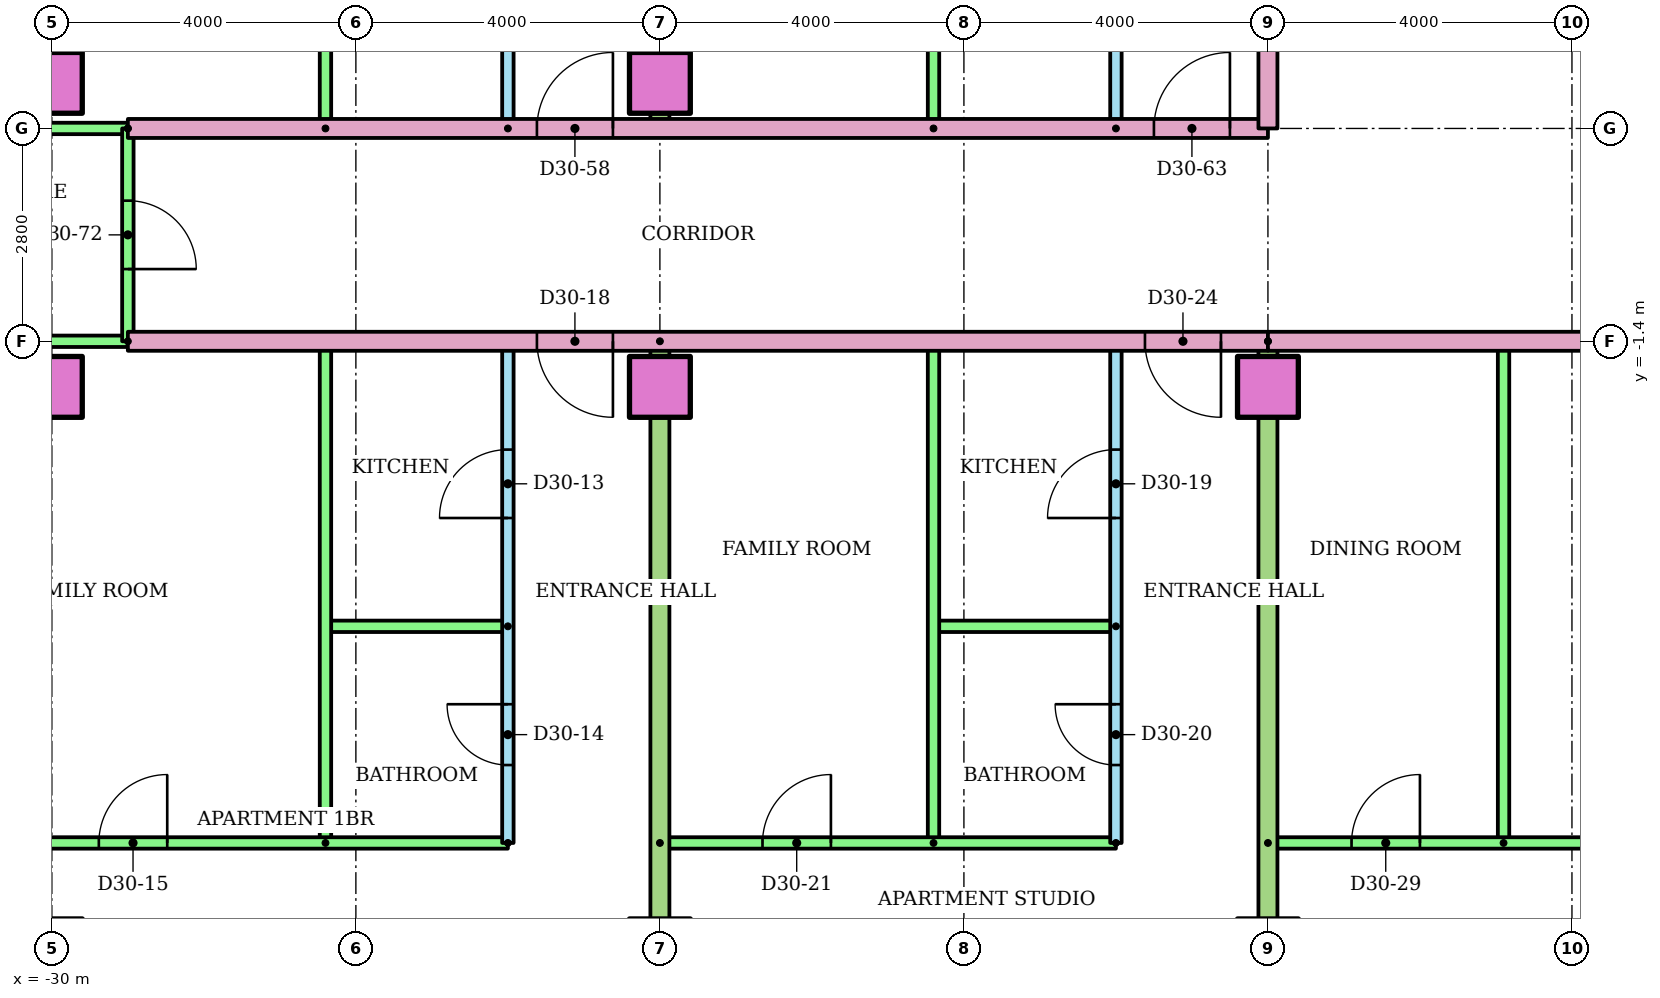
"""IFC4 building model, lengths in metres.
Left out: names, types, materials, properties, quantities, classifications, styles, units other than length and angle.
Written with IfcOpenShell. Run it as: python <this file> out.ifc"""

import sys

from ifc_helpers import new_model, si_unit, direction, frame, frame_2d, origin, origin_2d, place, context, subcontext, project, spatial, rectangle, extrude, element, fill, save


model = new_model("IFC4")
c1 = context("Model", 3, precision=1e-05, world=origin(), true_north=direction((0.0, 1.0)))
c2 = subcontext(c1, "Body", "Model", "MODEL_VIEW")
j1 = project(units=[si_unit("LENGTHUNIT", "METRE"), si_unit("PLANEANGLEUNIT", "RADIAN")], contexts=[c1])
p1 = place(None, origin())
s1 = spatial("IfcSite", under=j1, at=p1, CompositionType="ELEMENT")
p2 = place(p1, origin())
s2 = spatial("IfcBuilding", under=s1, at=p2, CompositionType="ELEMENT")
p3 = place(p2, frame((0.0, 0.0, 119.8)))
s3 = spatial("IfcBuildingStorey", under=s2, at=p3, CompositionType="ELEMENT", Elevation=119.8)
for number, where in (
    (1, (-30.0, -9.4, 0.0)),
    (2, (-22.0, -9.4, 0.0)),
    (3, (-14.0, -9.4, 0.0)),
    (4, (-30.0, -2.0, 0.0)),
    (5, (-22.0, -2.0, 0.0)),
    (6, (-14.0, -2.0, 0.0)),
    (7, (-30.0, 2.0, 0.0)),
    (8, (-22.0, 2.0, 0.0)),
):
    element("IfcColumn", number, at=place(p3, frame(where)), inside=s3, PredefinedType="COLUMN", context=c2, shape_type="SweptSolid", body=[
        extrude(rectangle(XDim=0.8, YDim=0.8, at=origin_2d()), origin(), (0.0, 0.0, 1.0), 3.2),
    ])
p4 = place(p3, frame((-24.0, -8.0, 0.0), z_axis=(0.0, 0.0, 1.0), x_axis=(0.0, 1.0, 0.0)))
e9 = element("IfcWall", 9, at=p4, inside=s3, PredefinedType="PARTITIONING", context=c2, shape_type="SweptSolid", body=[
    extrude(rectangle(XDim=6.6, YDim=0.15, at=frame_2d((3.3, 0.0))), origin(), (0.0, 0.0, 1.0), 2.4),
])
p5 = place(p4, frame((4.275, 0.0, 0.0)))
e10 = element("IfcOpeningElement", 10, at=p5, cuts=e9, PredefinedType="OPENING", context=c2, shape_type="SweptSolid", body=[
    extrude(rectangle(XDim=0.9, YDim=2.1, at=frame_2d((0.45, 1.05))), frame((0.0, 0.085, 0.0), z_axis=(0.0, -1.0, 0.0), x_axis=(1.0, 0.0, 0.0)), (0.0, 0.0, 1.0), 0.17),
])
p6 = place(p4, frame((1.025, 0.0, 0.0)))
e11 = element("IfcOpeningElement", 11, at=p6, cuts=e9, PredefinedType="OPENING", context=c2, shape_type="SweptSolid", body=[
    extrude(rectangle(XDim=0.8, YDim=2.1, at=frame_2d((0.4, 1.05))), frame((0.0, 0.085, 0.0), z_axis=(0.0, -1.0, 0.0), x_axis=(1.0, 0.0, 0.0)), (0.0, 0.0, 1.0), 0.17),
])
p7 = place(p3, frame((-24.0, -5.15, 0.0), z_axis=(0.0, 0.0, 1.0), x_axis=(-1.0, 0.0, 0.0)))
e12 = element("IfcWall", 12, at=p7, inside=s3, PredefinedType="PARTITIONING", context=c2, shape_type="SweptSolid", body=[
    extrude(rectangle(XDim=2.4, YDim=0.15, at=frame_2d((1.2, 0.0))), origin(), (0.0, 0.0, 1.0), 2.4),
])
p8 = place(p3, frame((-26.4, -8.0, 0.0), z_axis=(0.0, 0.0, 1.0), x_axis=(0.0, 1.0, 0.0)))
e13 = element("IfcWall", 13, at=p8, inside=s3, PredefinedType="PARTITIONING", context=c2, shape_type="SweptSolid", body=[
    extrude(rectangle(XDim=6.6, YDim=0.15, at=frame_2d((3.3, 0.0))), origin(), (0.0, 0.0, 1.0), 2.4),
])
p9 = place(p3, frame((-32.71, -8.0, 0.0)))
e14 = element("IfcWall", 14, at=p9, inside=s3, PredefinedType="PARTITIONING", context=c2, shape_type="SweptSolid", body=[
    extrude(rectangle(XDim=8.71, YDim=0.15, at=frame_2d((4.355, 0.0))), origin(), (0.0, 0.0, 1.0), 2.4),
])
p10 = place(p9, frame((3.328, 0.0, 0.0)))
e15 = element("IfcOpeningElement", 15, at=p10, cuts=e14, PredefinedType="OPENING", context=c2, shape_type="SweptSolid", body=[
    extrude(rectangle(XDim=0.9, YDim=2.1, at=frame_2d((0.45, 1.05))), frame((0.0, 0.085, 0.0), z_axis=(0.0, -1.0, 0.0), x_axis=(1.0, 0.0, 0.0)), (0.0, 0.0, 1.0), 0.17),
])
p11 = place(p3, frame((-16.0, -8.0, 0.0), z_axis=(0.0, 0.0, 1.0), x_axis=(0.0, 1.0, 0.0)))
e16 = element("IfcWall", 16, at=p11, inside=s3, PredefinedType="PARTITIONING", context=c2, shape_type="SweptSolid", body=[
    extrude(rectangle(XDim=6.6, YDim=0.15, at=frame_2d((3.3, 0.0))), origin(), (0.0, 0.0, 1.0), 2.4),
])
p12 = place(p11, frame((4.275, 0.0, 0.0)))
e17 = element("IfcOpeningElement", 17, at=p12, cuts=e16, PredefinedType="OPENING", context=c2, shape_type="SweptSolid", body=[
    extrude(rectangle(XDim=0.9, YDim=2.1, at=frame_2d((0.45, 1.05))), frame((0.0, 0.085, 0.0), z_axis=(0.0, -1.0, 0.0), x_axis=(1.0, 0.0, 0.0)), (0.0, 0.0, 1.0), 0.17),
])
p13 = place(p11, frame((1.025, 0.0, 0.0)))
e18 = element("IfcOpeningElement", 18, at=p13, cuts=e16, PredefinedType="OPENING", context=c2, shape_type="SweptSolid", body=[
    extrude(rectangle(XDim=0.8, YDim=2.1, at=frame_2d((0.4, 1.05))), frame((0.0, 0.085, 0.0), z_axis=(0.0, -1.0, 0.0), x_axis=(1.0, 0.0, 0.0)), (0.0, 0.0, 1.0), 0.17),
])
p14 = place(p3, frame((-16.0, -5.15, 0.0), z_axis=(0.0, 0.0, 1.0), x_axis=(-1.0, 0.0, 0.0)))
e19 = element("IfcWall", 19, at=p14, inside=s3, PredefinedType="PARTITIONING", context=c2, shape_type="SweptSolid", body=[
    extrude(rectangle(XDim=2.4, YDim=0.15, at=frame_2d((1.2, 0.0))), origin(), (0.0, 0.0, 1.0), 2.4),
])
p15 = place(p3, frame((-18.4, -8.0, 0.0), z_axis=(0.0, 0.0, 1.0), x_axis=(0.0, 1.0, 0.0)))
e20 = element("IfcWall", 20, at=p15, inside=s3, PredefinedType="PARTITIONING", context=c2, shape_type="SweptSolid", body=[
    extrude(rectangle(XDim=6.6, YDim=0.15, at=frame_2d((3.3, 0.0))), origin(), (0.0, 0.0, 1.0), 2.4),
])
p16 = place(p3, frame((-22.0, -8.0, 0.0)))
e21 = element("IfcWall", 21, at=p16, inside=s3, PredefinedType="PARTITIONING", context=c2, shape_type="SweptSolid", body=[
    extrude(rectangle(XDim=6.0, YDim=0.15, at=frame_2d((3.0, 0.0))), origin(), (0.0, 0.0, 1.0), 2.4),
])
p17 = place(p16, frame((1.35, 0.0, 0.0)))
e22 = element("IfcOpeningElement", 22, at=p17, cuts=e21, PredefinedType="OPENING", context=c2, shape_type="SweptSolid", body=[
    extrude(rectangle(XDim=0.9, YDim=2.1, at=frame_2d((0.45, 1.05))), frame((0.0, 0.085, 0.0), z_axis=(0.0, -1.0, 0.0), x_axis=(1.0, 0.0, 0.0)), (0.0, 0.0, 1.0), 0.17),
])
p18 = place(p3, frame((-22.0, -1.4, 0.0), z_axis=(0.0, 0.0, 1.0), x_axis=(0.0, -1.0, 0.0)))
e23 = element("IfcWall", 23, at=p18, inside=s3, PredefinedType="PARTITIONING", context=c2, shape_type="SweptSolid", body=[
    extrude(rectangle(XDim=14.91, YDim=0.25, at=frame_2d((7.455, 0.0))), origin(), (0.0, 0.0, 1.0), 2.4),
])
p19 = place(p3, frame((-10.9, -8.0, 0.0), z_axis=(0.0, 0.0, 1.0), x_axis=(0.0, 1.0, 0.0)))
e24 = element("IfcWall", 24, at=p19, inside=s3, PredefinedType="PARTITIONING", context=c2, shape_type="SweptSolid", body=[
    extrude(rectangle(XDim=6.6, YDim=0.15, at=frame_2d((3.3, 0.0))), origin(), (0.0, 0.0, 1.0), 2.4),
])
p20 = place(p3, frame((-14.0, -8.0, 0.0)))
e25 = element("IfcWall", 25, at=p20, inside=s3, PredefinedType="PARTITIONING", context=c2, shape_type="SweptSolid", body=[
    extrude(rectangle(XDim=14.0, YDim=0.15, at=frame_2d((7.0, 0.0))), origin(), (0.0, 0.0, 1.0), 2.4),
])
p21 = place(p20, frame((8.775, 0.0, 0.0)))
e26 = element("IfcOpeningElement", 26, at=p21, cuts=e25, PredefinedType="OPENING", context=c2, shape_type="SweptSolid", body=[
    extrude(rectangle(XDim=0.9, YDim=2.1, at=frame_2d((0.45, 1.05))), frame((0.0, 0.085, 0.0), z_axis=(0.0, -1.0, 0.0), x_axis=(1.0, 0.0, 0.0)), (0.0, 0.0, 1.0), 0.17),
])
p22 = place(p20, frame((4.525, 0.0, 0.0)))
e27 = element("IfcOpeningElement", 27, at=p22, cuts=e25, PredefinedType="OPENING", context=c2, shape_type="SweptSolid", body=[
    extrude(rectangle(XDim=0.9, YDim=2.1, at=frame_2d((0.45, 1.05))), frame((0.0, 0.085, 0.0), z_axis=(0.0, -1.0, 0.0), x_axis=(1.0, 0.0, 0.0)), (0.0, 0.0, 1.0), 0.17),
])
p23 = place(p20, frame((1.1, 0.0, 0.0)))
e28 = element("IfcOpeningElement", 28, at=p23, cuts=e25, PredefinedType="OPENING", context=c2, shape_type="SweptSolid", body=[
    extrude(rectangle(XDim=0.9, YDim=2.1, at=frame_2d((0.45, 1.05))), frame((0.0, 0.085, 0.0), z_axis=(0.0, -1.0, 0.0), x_axis=(1.0, 0.0, 0.0)), (0.0, 0.0, 1.0), 0.17),
])
p24 = place(p3, frame((-14.0, -1.4, 0.0), z_axis=(0.0, 0.0, 1.0), x_axis=(0.0, -1.0, 0.0)))
e29 = element("IfcWall", 29, at=p24, inside=s3, PredefinedType="PARTITIONING", context=c2, shape_type="SweptSolid", body=[
    extrude(rectangle(XDim=14.91, YDim=0.25, at=frame_2d((7.455, 0.0))), origin(), (0.0, 0.0, 1.0), 2.4),
])
p25 = place(p3, frame((-14.0, -1.4, 0.0), z_axis=(0.0, 0.0, 1.0), x_axis=(-1.0, 0.0, 0.0)))
e30 = element("IfcWall", 30, at=p25, inside=s3, PredefinedType="PARTITIONING", context=c2, shape_type="SweptSolid", body=[
    extrude(rectangle(XDim=15.0, YDim=0.25, at=frame_2d((7.5, 0.0))), origin(), (0.0, 0.0, 1.0), 2.4),
])
p26 = place(p25, frame((8.618, 0.0, 0.0)))
e31 = element("IfcOpeningElement", 31, at=p26, cuts=e30, PredefinedType="OPENING", context=c2, shape_type="SweptSolid", body=[
    extrude(rectangle(XDim=1.0, YDim=2.1, at=frame_2d((0.5, 1.05))), frame((0.0, 0.135, 0.0), z_axis=(0.0, -1.0, 0.0), x_axis=(1.0, 0.0, 0.0)), (0.0, 0.0, 1.0), 0.27),
])
p27 = place(p25, frame((0.618, 0.0, 0.0)))
e32 = element("IfcOpeningElement", 32, at=p27, cuts=e30, PredefinedType="OPENING", context=c2, shape_type="SweptSolid", body=[
    extrude(rectangle(XDim=1.0, YDim=2.1, at=frame_2d((0.5, 1.05))), frame((0.0, 0.135, 0.0), z_axis=(0.0, -1.0, 0.0), x_axis=(1.0, 0.0, 0.0)), (0.0, 0.0, 1.0), 0.27),
])
p28 = place(p3, frame((-29.0, -1.4, 0.0), z_axis=(0.0, 0.0, 1.0), x_axis=(-1.0, 0.0, 0.0)))
e33 = element("IfcWall", 33, at=p28, inside=s3, PredefinedType="PARTITIONING", context=c2, shape_type="SweptSolid", body=[
    extrude(rectangle(XDim=3.72, YDim=0.15, at=frame_2d((1.86, 0.0))), origin(), (0.0, 0.0, 1.0), 2.4),
])
p29 = place(p3, frame((-24.0, 1.4, 0.0), z_axis=(0.0, 0.0, 1.0), x_axis=(0.0, 1.0, 0.0)))
e34 = element("IfcWall", 34, at=p29, inside=s3, PredefinedType="PARTITIONING", context=c2, shape_type="SweptSolid", body=[
    extrude(rectangle(XDim=9.0, YDim=0.15, at=frame_2d((4.5, 0.0))), origin(), (0.0, 0.0, 1.0), 2.4),
])
p30 = place(p29, frame((2.05, 0.0, 0.0)))
e35 = element("IfcOpeningElement", 35, at=p30, cuts=e34, PredefinedType="OPENING", context=c2, shape_type="SweptSolid", body=[
    extrude(rectangle(XDim=0.9, YDim=2.1, at=frame_2d((0.45, 1.05))), frame((0.0, 0.085, 0.0), z_axis=(0.0, -1.0, 0.0), x_axis=(1.0, 0.0, 0.0)), (0.0, 0.0, 1.0), 0.17),
])
p31 = place(p29, frame((6.6, 0.0, 0.0)))
e36 = element("IfcOpeningElement", 36, at=p31, cuts=e34, PredefinedType="OPENING", context=c2, shape_type="SweptSolid", body=[
    extrude(rectangle(XDim=0.8, YDim=2.1, at=frame_2d((0.4, 1.05))), frame((0.0, 0.085, 0.0), z_axis=(0.0, -1.0, 0.0), x_axis=(1.0, 0.0, 0.0)), (0.0, 0.0, 1.0), 0.17),
])
p32 = place(p3, frame((-26.4, 1.4, 0.0), z_axis=(0.0, 0.0, 1.0), x_axis=(0.0, 1.0, 0.0)))
e37 = element("IfcWall", 37, at=p32, inside=s3, PredefinedType="PARTITIONING", context=c2, shape_type="SweptSolid", body=[
    extrude(rectangle(XDim=9.0, YDim=0.15, at=frame_2d((4.5, 0.0))), origin(), (0.0, 0.0, 1.0), 2.4),
])
p33 = place(p3, frame((-16.0, 1.4, 0.0), z_axis=(0.0, 0.0, 1.0), x_axis=(0.0, 1.0, 0.0)))
e38 = element("IfcWall", 38, at=p33, inside=s3, PredefinedType="PARTITIONING", context=c2, shape_type="SweptSolid", body=[
    extrude(rectangle(XDim=9.0, YDim=0.15, at=frame_2d((4.5, 0.0))), origin(), (0.0, 0.0, 1.0), 2.4),
])
p34 = place(p33, frame((2.05, 0.0, 0.0)))
e39 = element("IfcOpeningElement", 39, at=p34, cuts=e38, PredefinedType="OPENING", context=c2, shape_type="SweptSolid", body=[
    extrude(rectangle(XDim=0.9, YDim=2.1, at=frame_2d((0.45, 1.05))), frame((0.0, 0.085, 0.0), z_axis=(0.0, -1.0, 0.0), x_axis=(1.0, 0.0, 0.0)), (0.0, 0.0, 1.0), 0.17),
])
p35 = place(p33, frame((6.6, 0.0, 0.0)))
e40 = element("IfcOpeningElement", 40, at=p35, cuts=e38, PredefinedType="OPENING", context=c2, shape_type="SweptSolid", body=[
    extrude(rectangle(XDim=0.8, YDim=2.1, at=frame_2d((0.4, 1.05))), frame((0.0, 0.085, 0.0), z_axis=(0.0, -1.0, 0.0), x_axis=(1.0, 0.0, 0.0)), (0.0, 0.0, 1.0), 0.17),
])
p36 = place(p3, frame((-18.4, 1.4, 0.0), z_axis=(0.0, 0.0, 1.0), x_axis=(0.0, 1.0, 0.0)))
e41 = element("IfcWall", 41, at=p36, inside=s3, PredefinedType="PARTITIONING", context=c2, shape_type="SweptSolid", body=[
    extrude(rectangle(XDim=9.0, YDim=0.15, at=frame_2d((4.5, 0.0))), origin(), (0.0, 0.0, 1.0), 2.4),
])
p37 = place(p3, frame((-22.0, 18.721, 0.0), z_axis=(0.0, 0.0, 1.0), x_axis=(0.0, -1.0, 0.0)))
e42 = element("IfcWall", 42, at=p37, inside=s3, PredefinedType="PARTITIONING", context=c2, shape_type="SweptSolid", body=[
    extrude(rectangle(XDim=17.321, YDim=0.25, at=frame_2d((8.661, 0.0))), origin(), (0.0, 0.0, 1.0), 2.4),
])
p38 = place(p3, frame((-29.0, 1.4, 0.0)))
e43 = element("IfcWall", 43, at=p38, inside=s3, PredefinedType="PARTITIONING", context=c2, shape_type="SweptSolid", body=[
    extrude(rectangle(XDim=15.0, YDim=0.25, at=frame_2d((7.5, 0.0))), origin(), (0.0, 0.0, 1.0), 2.4),
])
p39 = place(p38, frame((5.382, 0.0, 0.0)))
e44 = element("IfcOpeningElement", 44, at=p39, cuts=e43, PredefinedType="OPENING", context=c2, shape_type="SweptSolid", body=[
    extrude(rectangle(XDim=1.0, YDim=2.1, at=frame_2d((0.5, 1.05))), frame((0.0, 0.135, 0.0), z_axis=(0.0, -1.0, 0.0), x_axis=(1.0, 0.0, 0.0)), (0.0, 0.0, 1.0), 0.27),
])
p40 = place(p38, frame((13.5, 0.0, 0.0)))
e45 = element("IfcOpeningElement", 45, at=p40, cuts=e43, PredefinedType="OPENING", context=c2, shape_type="SweptSolid", body=[
    extrude(rectangle(XDim=1.0, YDim=2.1, at=frame_2d((0.5, 1.05))), frame((0.0, 0.135, 0.0), z_axis=(0.0, -1.0, 0.0), x_axis=(1.0, 0.0, 0.0)), (0.0, 0.0, 1.0), 0.27),
])
p41 = place(p3, frame((-32.72, 1.4, 0.0)))
e46 = element("IfcWall", 46, at=p41, inside=s3, PredefinedType="PARTITIONING", context=c2, shape_type="SweptSolid", body=[
    extrude(rectangle(XDim=3.72, YDim=0.15, at=frame_2d((1.86, 0.0))), origin(), (0.0, 0.0, 1.0), 2.4),
])
p42 = place(p3, frame((-29.0, 1.4, 0.0), z_axis=(0.0, 0.0, 1.0), x_axis=(0.0, -1.0, 0.0)))
e47 = element("IfcWall", 47, at=p42, inside=s3, PredefinedType="PARTITIONING", context=c2, shape_type="SweptSolid", body=[
    extrude(rectangle(XDim=2.8, YDim=0.15, at=frame_2d((1.4, 0.0))), origin(), (0.0, 0.0, 1.0), 2.4),
])
p43 = place(p42, frame((0.95, 0.0, 0.0)))
e48 = element("IfcOpeningElement", 48, at=p43, cuts=e47, PredefinedType="OPENING", context=c2, shape_type="SweptSolid", body=[
    extrude(rectangle(XDim=0.9, YDim=2.1, at=frame_2d((0.45, 1.05))), frame((0.0, 0.085, 0.0), z_axis=(0.0, -1.0, 0.0), x_axis=(1.0, 0.0, 0.0)), (0.0, 0.0, 1.0), 0.17),
])
p44 = place(p3, frame((14.0, -1.4, 0.0), z_axis=(0.0, 0.0, 1.0), x_axis=(-1.0, 0.0, 0.0)))
e49 = element("IfcWall", 49, at=p44, inside=s3, PredefinedType="PARTITIONING", context=c2, shape_type="SweptSolid", body=[
    extrude(rectangle(XDim=28.0, YDim=0.25, at=frame_2d((14.0, 0.0))), origin(), (0.0, 0.0, 1.0), 2.4),
])
p45 = place(p44, frame((12.618, 0.0, 0.0)))
e50 = element("IfcOpeningElement", 50, at=p45, cuts=e49, PredefinedType="OPENING", context=c2, shape_type="SweptSolid", body=[
    extrude(rectangle(XDim=1.0, YDim=2.1, at=frame_2d((0.5, 1.05))), frame((0.0, 0.135, 0.0), z_axis=(0.0, -1.0, 0.0), x_axis=(1.0, 0.0, 0.0)), (0.0, 0.0, 1.0), 0.27),
])
p46 = place(p44, frame((10.382, 0.0, 0.0)))
e51 = element("IfcOpeningElement", 51, at=p46, cuts=e49, PredefinedType="OPENING", context=c2, shape_type="SweptSolid", body=[
    extrude(rectangle(XDim=1.0, YDim=2.1, at=frame_2d((0.5, 1.05))), frame((0.0, 0.135, 0.0), z_axis=(0.0, -1.0, 0.0), x_axis=(1.0, 0.0, 0.0)), (0.0, 0.0, 1.0), 0.27),
])
p47 = place(p3, frame((-14.0, 3.0, 0.0), z_axis=(0.0, 0.0, 1.0), x_axis=(0.0, -1.0, 0.0)))
e52 = element("IfcWall", 52, at=p47, inside=s3, PredefinedType="PARTITIONING", context=c2, shape_type="SweptSolid", body=[
    extrude(rectangle(XDim=1.6, YDim=0.25, at=frame_2d((0.8, 0.0))), origin(), (0.0, 0.0, 1.0), 2.4),
])
p48 = place(p5, origin())
e53 = element("IfcDoor", 53, at=p48, inside=s3, OperationType="SINGLE_SWING_LEFT", PredefinedType="DOOR", context=c2, shape_type="SweptSolid", body=[
    extrude(rectangle(XDim=0.9, YDim=2.1, at=frame_2d((0.45, 1.05))), frame((0.0, 0.025, 0.0), z_axis=(0.0, -1.0, 0.0), x_axis=(1.0, 0.0, 0.0)), (0.0, 0.0, 1.0), 0.05),
])
fill(e10, e53)
p49 = place(p6, origin())
e54 = element("IfcDoor", 54, at=p49, inside=s3, OperationType="SINGLE_SWING_RIGHT", PredefinedType="DOOR", context=c2, shape_type="SweptSolid", body=[
    extrude(rectangle(XDim=0.8, YDim=2.1, at=frame_2d((0.4, 1.05))), frame((0.0, 0.025, 0.0), z_axis=(0.0, -1.0, 0.0), x_axis=(1.0, 0.0, 0.0)), (0.0, 0.0, 1.0), 0.05),
])
fill(e11, e54)
p50 = place(p10, origin())
e55 = element("IfcDoor", 55, at=p50, inside=s3, OperationType="SINGLE_SWING_RIGHT", PredefinedType="DOOR", context=c2, shape_type="SweptSolid", body=[
    extrude(rectangle(XDim=0.9, YDim=2.1, at=frame_2d((0.45, 1.05))), frame((0.0, 0.025, 0.0), z_axis=(0.0, -1.0, 0.0), x_axis=(1.0, 0.0, 0.0)), (0.0, 0.0, 1.0), 0.05),
])
fill(e15, e55)
p51 = place(p26, origin())
e56 = element("IfcDoor", 56, at=p51, inside=s3, OperationType="SINGLE_SWING_LEFT", PredefinedType="DOOR", context=c2, shape_type="SweptSolid", body=[
    extrude(rectangle(XDim=1.0, YDim=2.1, at=frame_2d((0.5, 1.05))), frame((0.0, 0.025, 0.0), z_axis=(0.0, -1.0, 0.0), x_axis=(1.0, 0.0, 0.0)), (0.0, 0.0, 1.0), 0.05),
])
fill(e31, e56)
p52 = place(p12, origin())
e57 = element("IfcDoor", 57, at=p52, inside=s3, OperationType="SINGLE_SWING_LEFT", PredefinedType="DOOR", context=c2, shape_type="SweptSolid", body=[
    extrude(rectangle(XDim=0.9, YDim=2.1, at=frame_2d((0.45, 1.05))), frame((0.0, 0.025, 0.0), z_axis=(0.0, -1.0, 0.0), x_axis=(1.0, 0.0, 0.0)), (0.0, 0.0, 1.0), 0.05),
])
fill(e17, e57)
p53 = place(p13, origin())
e58 = element("IfcDoor", 58, at=p53, inside=s3, OperationType="SINGLE_SWING_RIGHT", PredefinedType="DOOR", context=c2, shape_type="SweptSolid", body=[
    extrude(rectangle(XDim=0.8, YDim=2.1, at=frame_2d((0.4, 1.05))), frame((0.0, 0.025, 0.0), z_axis=(0.0, -1.0, 0.0), x_axis=(1.0, 0.0, 0.0)), (0.0, 0.0, 1.0), 0.05),
])
fill(e18, e58)
p54 = place(p17, origin())
e59 = element("IfcDoor", 59, at=p54, inside=s3, OperationType="SINGLE_SWING_RIGHT", PredefinedType="DOOR", context=c2, shape_type="SweptSolid", body=[
    extrude(rectangle(XDim=0.9, YDim=2.1, at=frame_2d((0.45, 1.05))), frame((0.0, 0.025, 0.0), z_axis=(0.0, -1.0, 0.0), x_axis=(1.0, 0.0, 0.0)), (0.0, 0.0, 1.0), 0.05),
])
fill(e22, e59)
p55 = place(p27, origin())
e60 = element("IfcDoor", 60, at=p55, inside=s3, OperationType="SINGLE_SWING_LEFT", PredefinedType="DOOR", context=c2, shape_type="SweptSolid", body=[
    extrude(rectangle(XDim=1.0, YDim=2.1, at=frame_2d((0.5, 1.05))), frame((0.0, 0.025, 0.0), z_axis=(0.0, -1.0, 0.0), x_axis=(1.0, 0.0, 0.0)), (0.0, 0.0, 1.0), 0.05),
])
fill(e32, e60)
p56 = place(p23, origin())
e61 = element("IfcDoor", 61, at=p56, inside=s3, OperationType="SINGLE_SWING_RIGHT", PredefinedType="DOOR", context=c2, shape_type="SweptSolid", body=[
    extrude(rectangle(XDim=0.9, YDim=2.1, at=frame_2d((0.45, 1.05))), frame((0.0, 0.025, 0.0), z_axis=(0.0, -1.0, 0.0), x_axis=(1.0, 0.0, 0.0)), (0.0, 0.0, 1.0), 0.05),
])
fill(e28, e61)
p57 = place(p39, origin())
e62 = element("IfcDoor", 62, at=p57, inside=s3, OperationType="SINGLE_SWING_RIGHT", PredefinedType="DOOR", context=c2, shape_type="SweptSolid", body=[
    extrude(rectangle(XDim=1.0, YDim=2.1, at=frame_2d((0.5, 1.05))), frame((0.0, 0.025, 0.0), z_axis=(0.0, -1.0, 0.0), x_axis=(1.0, 0.0, 0.0)), (0.0, 0.0, 1.0), 0.05),
])
fill(e44, e62)
p58 = place(p40, origin())
e63 = element("IfcDoor", 63, at=p58, inside=s3, OperationType="SINGLE_SWING_RIGHT", PredefinedType="DOOR", context=c2, shape_type="SweptSolid", body=[
    extrude(rectangle(XDim=1.0, YDim=2.1, at=frame_2d((0.5, 1.05))), frame((0.0, 0.025, 0.0), z_axis=(0.0, -1.0, 0.0), x_axis=(1.0, 0.0, 0.0)), (0.0, 0.0, 1.0), 0.05),
])
fill(e45, e63)
p59 = place(p43, origin())
e64 = element("IfcDoor", 64, at=p59, inside=s3, OperationType="SINGLE_SWING_RIGHT", PredefinedType="DOOR", context=c2, shape_type="SweptSolid", body=[
    extrude(rectangle(XDim=0.9, YDim=2.1, at=frame_2d((0.45, 1.05))), frame((0.0, 0.025, 0.0), z_axis=(0.0, -1.0, 0.0), x_axis=(1.0, 0.0, 0.0)), (0.0, 0.0, 1.0), 0.05),
])
fill(e48, e64)
save(model, sys.argv[1])
